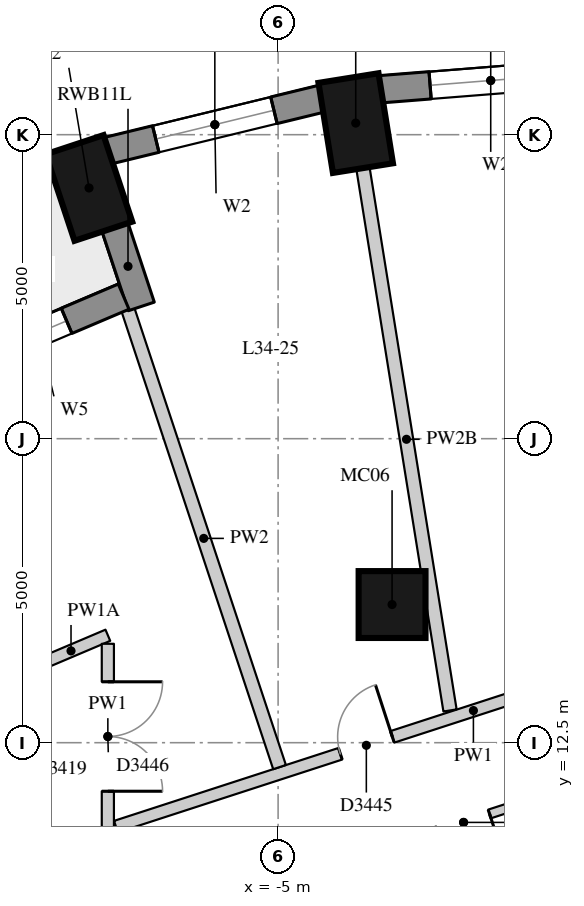
"""IFC4 building model, lengths in metres.
Left out: names, types, materials, properties, quantities, classifications, styles, units other than length and angle.
Written with IfcOpenShell. Run it as: python <this file> out.ifc"""

import sys

from ifc_helpers import new_model, si_unit, direction, frame, frame_2d, origin, origin_2d, place, context, subcontext, project, spatial, rectangle, extrude, element, fill, save


model = new_model("IFC4")
c1 = context("Model", 3, precision=1e-05, world=origin(), true_north=direction((0.0, 1.0)))
c2 = subcontext(c1, "Body", "Model", "MODEL_VIEW")
j1 = project(units=[si_unit("LENGTHUNIT", "METRE"), si_unit("PLANEANGLEUNIT", "RADIAN")], contexts=[c1])
p1 = place(None, origin())
s1 = spatial("IfcSite", under=j1, at=p1, CompositionType="ELEMENT")
p2 = place(p1, origin())
s2 = spatial("IfcBuilding", under=s1, at=p2, CompositionType="ELEMENT")
p3 = place(p2, frame((0.0, 0.0, 121.9)))
s3 = spatial("IfcBuildingStorey", under=s2, at=p3, CompositionType="ELEMENT", Elevation=121.9)
for number, where, z_axis, x_axis in (
    (1, (-3.724, 22.691, 0.0), (0.0, 0.0, 1.0), (-0.159, 0.987, 0.0)),
    (2, (-8.11, 21.624, 0.0), (0.0, 0.0, 1.0), (-0.315, 0.949, 0.0)),
):
    element("IfcColumn", number, at=place(p3, frame(where, z_axis=z_axis, x_axis=x_axis)), inside=s3, PredefinedType="COLUMN", context=c2, shape_type="SweptSolid", body=[
        extrude(rectangle(XDim=1.5, YDim=1.0, at=origin_2d()), origin(), (0.0, 0.0, 1.0), 3.3),
    ])
p4 = place(p3, frame((-3.126, 14.772, 0.0), z_axis=(0.0, 0.0, 1.0), x_axis=(1.0, 0.0, 0.0)))
e3 = element("IfcColumn", 3, at=p4, inside=s3, PredefinedType="COLUMN", context=c2, shape_type="SweptSolid", body=[
    extrude(rectangle(XDim=1.1, YDim=1.1, at=origin_2d()), origin(), (0.0, 0.0, 1.0), 3.3),
])
p5 = place(p3, frame((0.32, 23.536, 0.0), z_axis=(0.0, 0.0, 1.0), x_axis=(-0.996862216754, -0.079156306178, 0.0)))
e4 = element("IfcWall", 4, at=p5, inside=s3, PredefinedType="SOLIDWALL", context=c2, shape_type="SweptSolid", body=[
    extrude(rectangle(XDim=3.658, YDim=0.45, at=frame_2d((1.829, 0.0))), origin(), (0.0, 0.0, 1.0), 3.02),
])
p6 = place(p5, frame((0.829, 0.0, 0.4)))
e5 = element("IfcOpeningElement", 5, at=p6, cuts=e4, PredefinedType="OPENING", context=c2, shape_type="SweptSolid", body=[
    extrude(rectangle(XDim=2.0, YDim=1.75, at=frame_2d((1.0, 0.875))), frame((0.0, 0.235, 0.0), z_axis=(0.0, -1.0, 0.0), x_axis=(1.0, 0.0, 0.0)), (0.0, 0.0, 1.0), 0.47),
])
p7 = place(p3, frame((-4.275, 23.094, 0.0), z_axis=(0.0, 0.0, 1.0), x_axis=(-0.971667603162, -0.236351579148, 0.0)))
e6 = element("IfcWall", 6, at=p7, inside=s3, PredefinedType="SOLIDWALL", context=c2, shape_type="SweptSolid", body=[
    extrude(rectangle(XDim=3.635, YDim=0.45, at=frame_2d((1.817, 0.0))), origin(), (0.0, 0.0, 1.0), 3.02),
])
p8 = place(p7, frame((0.817, 0.0, 0.4)))
e7 = element("IfcOpeningElement", 7, at=p8, cuts=e6, PredefinedType="OPENING", context=c2, shape_type="SweptSolid", body=[
    extrude(rectangle(XDim=2.0, YDim=1.75, at=frame_2d((1.0, 0.875))), frame((0.0, 0.235, 0.0), z_axis=(0.0, -1.0, 0.0), x_axis=(1.0, 0.0, 0.0)), (0.0, 0.0, 1.0), 0.47),
])
p9 = place(p3, frame((-7.687, 20.995, 0.0), z_axis=(0.0, 0.0, 1.0), x_axis=(0.314541283205, -0.949243794375, 0.0)))
e8 = element("IfcWall", 8, at=p9, inside=s3, PredefinedType="SOLIDWALL", context=c2, shape_type="SweptSolid", body=[
    extrude(rectangle(XDim=1.39, YDim=0.45, at=frame_2d((0.695, 0.0))), origin(), (0.0, 0.0, 1.0), 3.02),
])
p10 = place(p3, frame((-7.54, 19.836, 0.0), z_axis=(0.0, 0.0, 1.0), x_axis=(-0.920502375708, -0.390736965637, 0.0)))
e9 = element("IfcWall", 9, at=p10, inside=s3, PredefinedType="SOLIDWALL", context=c2, shape_type="SweptSolid", body=[
    extrude(rectangle(XDim=4.188, YDim=0.45, at=frame_2d((2.094, 0.0))), origin(), (0.0, 0.0, 1.0), 3.02),
])
p11 = place(p10, frame((1.019, 0.0, 0.4)))
e10 = element("IfcOpeningElement", 10, at=p11, cuts=e9, PredefinedType="OPENING", context=c2, shape_type="SweptSolid", body=[
    extrude(rectangle(XDim=1.0, YDim=1.75, at=frame_2d((0.5, 0.875))), frame((0.0, 0.235, 0.0), z_axis=(0.0, -1.0, 0.0), x_axis=(1.0, 0.0, 0.0)), (0.0, 0.0, 1.0), 0.47),
])
p12 = place(p10, frame((2.169, 0.0, 0.0)))
e11 = element("IfcOpeningElement", 11, at=p12, cuts=e9, PredefinedType="OPENING", context=c2, shape_type="SweptSolid", body=[
    extrude(rectangle(XDim=1.0, YDim=2.15, at=frame_2d((0.5, 1.075))), frame((0.0, 0.235, 0.0), z_axis=(0.0, -1.0, 0.0), x_axis=(1.0, 0.0, 0.0)), (0.0, 0.0, 1.0), 0.47),
])
p13 = place(p3, frame((-9.011, 13.752, 0.0), z_axis=(0.0, 0.0, 1.0), x_axis=(0.920454408747, 0.390849947446, 0.0)))
e12 = element("IfcWall", 12, at=p13, inside=s3, PredefinedType="PARTITIONING", context=c2, shape_type="SweptSolid", body=[
    extrude(rectangle(XDim=1.316, YDim=0.2, at=frame_2d((0.658, 0.0))), origin(), (0.0, 0.0, 1.0), 2.57),
])
p14 = place(p3, frame((-7.8, 14.127, 0.0), z_axis=(0.0, 0.0, 1.0), x_axis=(0.0, -1.0, 0.0)))
e13 = element("IfcWall", 13, at=p14, inside=s3, PredefinedType="PARTITIONING", context=c2, shape_type="SweptSolid", body=[
    extrude(rectangle(XDim=3.05, YDim=0.2, at=frame_2d((1.525, 0.0))), origin(), (0.0, 0.0, 1.0), 3.02),
])
p15 = place(p14, frame((0.625, 0.0, 0.0)))
e14 = element("IfcOpeningElement", 14, at=p15, cuts=e13, PredefinedType="OPENING", context=c2, shape_type="SweptSolid", body=[
    extrude(rectangle(XDim=1.8, YDim=2.1, at=frame_2d((0.9, 1.05))), frame((0.0, 0.11, 0.0), z_axis=(0.0, -1.0, 0.0), x_axis=(1.0, 0.0, 0.0)), (0.0, 0.0, 1.0), 0.22),
])
p16 = place(p3, frame((-7.667, 11.119, 0.0), z_axis=(0.0, 0.0, 1.0), x_axis=(0.951088334028, 0.308919052304, 0.0)))
e15 = element("IfcWall", 15, at=p16, inside=s3, PredefinedType="PARTITIONING", context=c2, shape_type="SweptSolid", body=[
    extrude(rectangle(XDim=12.362, YDim=0.2, at=frame_2d((6.181, 0.0))), origin(), (0.0, 0.0, 1.0), 3.02),
])
p17 = place(p16, frame((7.686, 0.0, 0.0)))
e16 = element("IfcOpeningElement", 16, at=p17, cuts=e15, PredefinedType="OPENING", context=c2, shape_type="SweptSolid", body=[
    extrude(rectangle(XDim=1.1, YDim=2.1, at=frame_2d((0.55, 1.05))), frame((0.0, 0.11, 0.0), z_axis=(0.0, -1.0, 0.0), x_axis=(1.0, 0.0, 0.0)), (0.0, 0.0, 1.0), 0.22),
])
p18 = place(p16, frame((3.88, 0.0, 0.0)))
e17 = element("IfcOpeningElement", 17, at=p18, cuts=e15, PredefinedType="OPENING", context=c2, shape_type="SweptSolid", body=[
    extrude(rectangle(XDim=0.9, YDim=2.1, at=frame_2d((0.45, 1.05))), frame((0.0, 0.11, 0.0), z_axis=(0.0, -1.0, 0.0), x_axis=(1.0, 0.0, 0.0)), (0.0, 0.0, 1.0), 0.22),
])
p19 = place(p3, frame((-4.5, 10.361, 0.0), z_axis=(0.0, 0.0, 1.0), x_axis=(0.951090931116, 0.308911056372, 0.0)))
e18 = element("IfcWall", 18, at=p19, inside=s3, PredefinedType="PARTITIONING", context=c2, shape_type="SweptSolid", body=[
    extrude(rectangle(XDim=5.362, YDim=0.15, at=frame_2d((2.681, 0.0))), origin(), (0.0, 0.0, 1.0), 3.02),
])
p20 = place(p19, frame((2.231, 0.0, 0.0)))
e19 = element("IfcOpeningElement", 19, at=p20, cuts=e18, PredefinedType="OPENING", context=c2, shape_type="SweptSolid", body=[
    extrude(rectangle(XDim=0.9, YDim=2.1, at=frame_2d((0.45, 1.05))), frame((0.0, 0.085, 0.0), z_axis=(0.0, -1.0, 0.0), x_axis=(1.0, 0.0, 0.0)), (0.0, 0.0, 1.0), 0.17),
])
p21 = place(p3, frame((-3.605, 21.95, 0.0), z_axis=(0.0, 0.0, 1.0), x_axis=(0.158519564718, -0.987355836364, 0.0)))
e20 = element("IfcWall", 20, at=p21, inside=s3, PredefinedType="PARTITIONING", context=c2, shape_type="SweptSolid", body=[
    extrude(rectangle(XDim=9.034, YDim=0.22, at=frame_2d((4.517, 0.0))), origin(), (0.0, 0.0, 1.0), 2.57),
])
p22 = place(p3, frame((-7.469, 19.622, 0.0), z_axis=(0.0, 0.0, 1.0), x_axis=(0.314545340174, -0.949242450049, 0.0)))
e21 = element("IfcWall", 21, at=p22, inside=s3, PredefinedType="PARTITIONING", context=c2, shape_type="SweptSolid", body=[
    extrude(rectangle(XDim=7.926, YDim=0.22, at=frame_2d((3.963, 0.0))), origin(), (0.0, 0.0, 1.0), 3.02),
])
p23 = place(p6, origin())
e22 = element("IfcWindow", 22, at=p23, inside=s3, PartitioningType="SINGLE_PANEL", PredefinedType="WINDOW", context=c2, shape_type="SweptSolid", body=[
    extrude(rectangle(XDim=2.0, YDim=1.75, at=frame_2d((1.0, 0.875))), frame((0.0, 0.035, 0.0), z_axis=(0.0, -1.0, 0.0), x_axis=(1.0, 0.0, 0.0)), (0.0, 0.0, 1.0), 0.06),
])
fill(e5, e22)
p24 = place(p8, origin())
e23 = element("IfcWindow", 23, at=p24, inside=s3, PartitioningType="SINGLE_PANEL", PredefinedType="WINDOW", context=c2, shape_type="SweptSolid", body=[
    extrude(rectangle(XDim=2.0, YDim=1.75, at=frame_2d((1.0, 0.875))), frame((0.0, 0.035, 0.0), z_axis=(0.0, -1.0, 0.0), x_axis=(1.0, 0.0, 0.0)), (0.0, 0.0, 1.0), 0.06),
])
fill(e7, e23)
p25 = place(p11, origin())
e24 = element("IfcWindow", 24, at=p25, inside=s3, PartitioningType="SINGLE_PANEL", PredefinedType="WINDOW", context=c2, shape_type="SweptSolid", body=[
    extrude(rectangle(XDim=1.0, YDim=1.75, at=frame_2d((0.5, 0.875))), frame((0.0, 0.035, 0.0), z_axis=(0.0, -1.0, 0.0), x_axis=(1.0, 0.0, 0.0)), (0.0, 0.0, 1.0), 0.06),
])
fill(e10, e24)
p26 = place(p18, origin())
e25 = element("IfcDoor", 25, at=p26, inside=s3, OperationType="SINGLE_SWING_RIGHT", PredefinedType="DOOR", context=c2, shape_type="SweptSolid", body=[
    extrude(rectangle(XDim=0.9, YDim=2.1, at=frame_2d((0.45, 1.05))), frame((0.0, 0.025, 0.0), z_axis=(0.0, -1.0, 0.0), x_axis=(1.0, 0.0, 0.0)), (0.0, 0.0, 1.0), 0.05),
])
fill(e17, e25)
p27 = place(p15, origin())
e26 = element("IfcDoor", 26, at=p27, inside=s3, OperationType="DOUBLE_DOOR_SINGLE_SWING", PredefinedType="DOOR", context=c2, shape_type="SweptSolid", body=[
    extrude(rectangle(XDim=1.8, YDim=2.1, at=frame_2d((0.9, 1.05))), frame((0.0, 0.025, 0.0), z_axis=(0.0, -1.0, 0.0), x_axis=(1.0, 0.0, 0.0)), (0.0, 0.0, 1.0), 0.05),
])
fill(e14, e26)
p28 = place(p20, origin())
e27 = element("IfcDoor", 27, at=p28, inside=s3, OperationType="SINGLE_SWING_LEFT", PredefinedType="DOOR", context=c2, shape_type="SweptSolid", body=[
    extrude(rectangle(XDim=0.9, YDim=2.1, at=frame_2d((0.45, 1.05))), frame((0.0, 0.025, 0.0), z_axis=(0.0, -1.0, 0.0), x_axis=(1.0, 0.0, 0.0)), (0.0, 0.0, 1.0), 0.05),
])
fill(e19, e27)
save(model, sys.argv[1])
